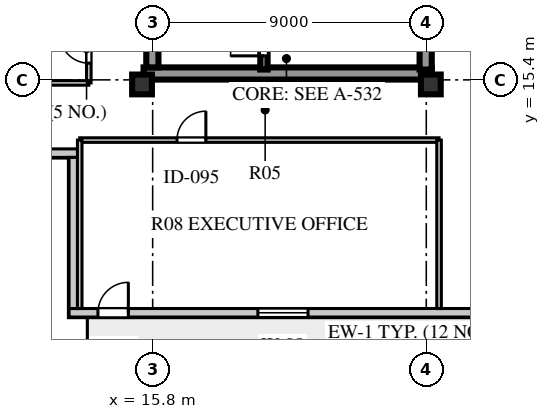
"""IFC4 building model, lengths in metres.
Left out: names, types, materials, properties, quantities, classifications, styles, units other than length and angle.
Written with IfcOpenShell. Run it as: python <this file> out.ifc"""

import sys

from ifc_helpers import new_model, si_unit, direction, frame, frame_2d, origin, origin_2d, place, context, subcontext, project, spatial, rectangle, extrude, element, fill, save


model = new_model("IFC4")
c1 = context("Model", 3, precision=1e-05, world=origin(), true_north=direction((0.0, 1.0)))
c2 = subcontext(c1, "Body", "Model", "MODEL_VIEW")
j1 = project(units=[si_unit("LENGTHUNIT", "METRE"), si_unit("PLANEANGLEUNIT", "RADIAN")], contexts=[c1])
p1 = place(None, origin())
s1 = spatial("IfcSite", under=j1, at=p1, CompositionType="ELEMENT")
p2 = place(p1, origin())
s2 = spatial("IfcBuilding", under=s1, at=p2, CompositionType="ELEMENT")
p3 = place(p2, frame((0.0, 0.0, 245.3)))
s3 = spatial("IfcBuildingStorey", under=s2, at=p3, CompositionType="ELEMENT", Elevation=245.3)
p4 = place(p3, frame((15.5, 15.61, 0.0), z_axis=(0.0, 0.0, 1.0), x_axis=(1.0, 0.0, 0.0)))
e1 = element("IfcWall", 1, at=p4, inside=s3, PredefinedType="SHEAR", context=c2, shape_type="SweptSolid", body=[
    extrude(rectangle(XDim=9.48, YDim=0.4, at=frame_2d((4.74, 0.0))), origin(), (0.0, 0.0, 1.0), 3.66),
])
p5 = place(p3, frame((15.79, 15.81, 0.0), z_axis=(0.0, 0.0, 1.0), x_axis=(0.0, 1.0, 0.0)))
e2 = element("IfcWall", 2, at=p5, inside=s3, PredefinedType="SHEAR", context=c2, shape_type="SweptSolid", body=[
    extrude(rectangle(XDim=25.63, YDim=0.4, at=frame_2d((12.815, 0.0))), origin(), (0.0, 0.0, 1.0), 3.66),
])
p6 = place(p3, frame((24.78, 15.74, 0.0), z_axis=(0.0, 0.0, 1.0), x_axis=(0.0, 1.0, 0.0)))
e3 = element("IfcWall", 3, at=p6, inside=s3, PredefinedType="SHEAR", context=c2, shape_type="SweptSolid", body=[
    extrude(rectangle(XDim=25.76, YDim=0.4, at=frame_2d((12.88, 0.0))), origin(), (0.0, 0.0, 1.0), 3.66),
])
p7 = place(p6, frame((1.61, 0.0, 0.0)))
e4 = element("IfcOpeningElement", 4, at=p7, cuts=e3, PredefinedType="OPENING", context=c2, shape_type="SweptSolid", body=[
    extrude(rectangle(XDim=1.2, YDim=2.1, at=frame_2d((0.6, 1.05))), frame((0.0, 0.21, 0.0), z_axis=(0.0, -1.0, 0.0), x_axis=(1.0, 0.0, 0.0)), (0.0, 0.0, 1.0), 0.42),
])
p8 = place(p6, frame((6.78, 0.0, 0.0)))
e5 = element("IfcOpeningElement", 5, at=p8, cuts=e3, PredefinedType="OPENING", context=c2, shape_type="SweptSolid", body=[
    extrude(rectangle(XDim=0.85, YDim=2.06, at=frame_2d((0.425, 1.03))), frame((0.0, 0.21, 0.0), z_axis=(0.0, -1.0, 0.0), x_axis=(1.0, 0.0, 0.0)), (0.0, 0.0, 1.0), 0.42),
])
p9 = place(p6, frame((12.11, 0.0, 0.0)))
e6 = element("IfcOpeningElement", 6, at=p9, cuts=e3, PredefinedType="OPENING", context=c2, shape_type="SweptSolid", body=[
    extrude(rectangle(XDim=1.5, YDim=2.12, at=frame_2d((0.75, 1.06))), frame((0.0, 0.21, 0.0), z_axis=(0.0, -1.0, 0.0), x_axis=(1.0, 0.0, 0.0)), (0.0, 0.0, 1.0), 0.42),
])
p10 = place(p6, frame((20.11, 0.0, 0.0)))
e7 = element("IfcOpeningElement", 7, at=p10, cuts=e3, PredefinedType="OPENING", context=c2, shape_type="SweptSolid", body=[
    extrude(rectangle(XDim=1.2, YDim=2.12, at=frame_2d((0.6, 1.06))), frame((0.0, 0.21, 0.0), z_axis=(0.0, -1.0, 0.0), x_axis=(1.0, 0.0, 0.0)), (0.0, 0.0, 1.0), 0.42),
])
p11 = place(p6, frame((24.01, 0.0, 0.0)))
e8 = element("IfcOpeningElement", 8, at=p11, cuts=e3, PredefinedType="OPENING", context=c2, shape_type="SweptSolid", body=[
    extrude(rectangle(XDim=0.95, YDim=2.1, at=frame_2d((0.475, 1.05))), frame((0.0, 0.21, 0.0), z_axis=(0.0, -1.0, 0.0), x_axis=(1.0, 0.0, 0.0)), (0.0, 0.0, 1.0), 0.42),
])
for number, where, z_axis, x_axis in (
    (9, (15.45, 15.25, 0.0), (0.0, 0.0, 1.0), (1.0, 0.0, 0.0)),
    (10, (24.95, 15.25, 0.0), (0.0, 0.0, 1.0), (1.0, 0.0, 0.0)),
):
    element("IfcColumn", number, at=place(p3, frame(where, z_axis=z_axis, x_axis=x_axis)), inside=s3, PredefinedType="COLUMN", context=c2, shape_type="SweptSolid", body=[
        extrude(rectangle(XDim=0.65, YDim=0.65, at=origin_2d()), origin(), (0.0, 0.0, 1.0), 3.66),
    ])
p12 = place(p3, frame((13.05, 7.74, 0.0), z_axis=(0.0, 0.0, 1.0), x_axis=(1.0, 0.0, 0.0)))
e11 = element("IfcWall", 11, at=p12, inside=s3, PredefinedType="STANDARD", context=c2, shape_type="SweptSolid", body=[
    extrude(rectangle(XDim=32.5, YDim=0.28, at=frame_2d((16.25, 0.0))), origin(), (0.0, 0.0, 1.0), 3.66),
])
p13 = place(p12, frame((0.95, 0.0, 0.0)))
e12 = element("IfcOpeningElement", 12, at=p13, cuts=e11, PredefinedType="OPENING", context=c2, shape_type="SweptSolid", body=[
    extrude(rectangle(XDim=1.0, YDim=2.05, at=frame_2d((0.5, 1.025))), frame((0.0, 0.15, 0.0), z_axis=(0.0, -1.0, 0.0), x_axis=(1.0, 0.0, 0.0)), (0.0, 0.0, 1.0), 0.3),
])
p14 = place(p12, frame((6.21, 0.0, 0.8)))
e13 = element("IfcOpeningElement", 13, at=p14, cuts=e11, PredefinedType="OPENING", context=c2, shape_type="SweptSolid", body=[
    extrude(rectangle(XDim=1.65, YDim=1.95, at=frame_2d((0.825, 0.975))), frame((0.0, 0.15, 0.0), z_axis=(0.0, -1.0, 0.0), x_axis=(1.0, 0.0, 0.0)), (0.0, 0.0, 1.0), 0.3),
])
p15 = place(p12, frame((14.577, 0.0, 0.8)))
e14 = element("IfcOpeningElement", 14, at=p15, cuts=e11, PredefinedType="OPENING", context=c2, shape_type="SweptSolid", body=[
    extrude(rectangle(XDim=1.95, YDim=2.0, at=frame_2d((0.975, 1.0))), frame((0.0, 0.15, 0.0), z_axis=(0.0, -1.0, 0.0), x_axis=(1.0, 0.0, 0.0)), (0.0, 0.0, 1.0), 0.3),
])
p16 = place(p12, frame((20.463, 0.0, 0.8)))
e15 = element("IfcOpeningElement", 15, at=p16, cuts=e11, PredefinedType="OPENING", context=c2, shape_type="SweptSolid", body=[
    extrude(rectangle(XDim=2.25, YDim=2.0, at=frame_2d((1.125, 1.0))), frame((0.0, 0.15, 0.0), z_axis=(0.0, -1.0, 0.0), x_axis=(1.0, 0.0, 0.0)), (0.0, 0.0, 1.0), 0.3),
])
p17 = place(p12, frame((28.345, 0.0, 0.8)))
e16 = element("IfcOpeningElement", 16, at=p17, cuts=e11, PredefinedType="OPENING", context=c2, shape_type="SweptSolid", body=[
    extrude(rectangle(XDim=1.8, YDim=2.0, at=frame_2d((0.9, 1.0))), frame((0.0, 0.15, 0.0), z_axis=(0.0, -1.0, 0.0), x_axis=(1.0, 0.0, 0.0)), (0.0, 0.0, 1.0), 0.3),
])
p18 = place(p3, frame((7.8, 12.99, 0.0), z_axis=(0.0, 0.0, 1.0), x_axis=(1.0, 0.0, 0.0)))
e17 = element("IfcWall", 17, at=p18, inside=s3, PredefinedType="STANDARD", context=c2, shape_type="SweptSolid", body=[
    extrude(rectangle(XDim=5.53, YDim=0.28, at=frame_2d((2.765, 0.0))), origin(), (0.0, 0.0, 1.0), 3.66),
])
p19 = place(p3, frame((13.19, 12.85, 0.0), z_axis=(0.0, 0.0, 1.0), x_axis=(0.0, -1.0, 0.0)))
e18 = element("IfcWall", 18, at=p19, inside=s3, PredefinedType="STANDARD", context=c2, shape_type="SweptSolid", body=[
    extrude(rectangle(XDim=4.97, YDim=0.28, at=frame_2d((2.485, 0.0))), origin(), (0.0, 0.0, 1.0), 3.66),
])
p20 = place(p3, frame((19.46, 15.74, 0.0), z_axis=(0.0, 0.0, 1.0), x_axis=(0.0, 1.0, 0.0)))
e19 = element("IfcWall", 19, at=p20, inside=s3, PredefinedType="SHEAR", context=c2, shape_type="SweptSolid", body=[
    extrude(rectangle(XDim=8.2, YDim=0.24, at=frame_2d((4.1, 0.0))), origin(), (0.0, 0.0, 1.0), 3.9),
])
p21 = place(p20, frame((0.45, 0.0, 0.0)))
e20 = element("IfcOpeningElement", 20, at=p21, cuts=e19, PredefinedType="OPENING", context=c2, shape_type="SweptSolid", body=[
    extrude(rectangle(XDim=1.1, YDim=2.1, at=frame_2d((0.55, 1.05))), frame((0.0, 0.13, 0.0), z_axis=(0.0, -1.0, 0.0), x_axis=(1.0, 0.0, 0.0)), (0.0, 0.0, 1.0), 0.26),
])
p22 = place(p3, frame((13.4, 13.42, 0.0), z_axis=(0.0, 0.0, 1.0), x_axis=(1.0, 0.0, 0.0)))
e21 = element("IfcWall", 21, at=p22, inside=s3, PredefinedType="PARTITIONING", context=c2, shape_type="SweptSolid", body=[
    extrude(rectangle(XDim=11.82, YDim=0.15, at=frame_2d((5.91, 0.0))), origin(), (0.0, 0.0, 1.0), 3.66),
])
p23 = place(p22, frame((3.2, 0.0, 0.0)))
e22 = element("IfcOpeningElement", 22, at=p23, cuts=e21, PredefinedType="OPENING", context=c2, shape_type="SweptSolid", body=[
    extrude(rectangle(XDim=0.95, YDim=2.08, at=frame_2d((0.475, 1.04))), frame((0.0, 0.085, 0.0), z_axis=(0.0, -1.0, 0.0), x_axis=(1.0, 0.0, 0.0)), (0.0, 0.0, 1.0), 0.17),
])
p24 = place(p3, frame((13.4, 7.88, 0.0), z_axis=(0.0, 0.0, 1.0), x_axis=(0.0, 1.0, 0.0)))
e23 = element("IfcWall", 23, at=p24, inside=s3, PredefinedType="PARTITIONING", context=c2, shape_type="SweptSolid", body=[
    extrude(rectangle(XDim=5.54, YDim=0.15, at=frame_2d((2.77, 0.0))), origin(), (0.0, 0.0, 1.0), 3.66),
])
p25 = place(p3, frame((25.22, 7.88, 0.0), z_axis=(0.0, 0.0, 1.0), x_axis=(0.0, 1.0, 0.0)))
e24 = element("IfcWall", 24, at=p25, inside=s3, PredefinedType="PARTITIONING", context=c2, shape_type="SweptSolid", body=[
    extrude(rectangle(XDim=5.54, YDim=0.15, at=frame_2d((2.77, 0.0))), origin(), (0.0, 0.0, 1.0), 3.21),
])
p26 = place(p3, frame((13.7, 15.3, 0.0), z_axis=(0.0, 0.0, 1.0), x_axis=(0.0, 1.0, 0.0)))
e25 = element("IfcWall", 25, at=p26, inside=s3, PredefinedType="PARTITIONING", context=c2, shape_type="SweptSolid", body=[
    extrude(rectangle(XDim=26.6, YDim=0.15, at=frame_2d((13.3, 0.0))), origin(), (0.0, 0.0, 1.0), 3.66),
])
p27 = place(p26, frame((0.65, 0.0, 0.0)))
e26 = element("IfcOpeningElement", 26, at=p27, cuts=e25, PredefinedType="OPENING", context=c2, shape_type="SweptSolid", body=[
    extrude(rectangle(XDim=0.95, YDim=2.1, at=frame_2d((0.475, 1.05))), frame((0.0, 0.085, 0.0), z_axis=(0.0, -1.0, 0.0), x_axis=(1.0, 0.0, 0.0)), (0.0, 0.0, 1.0), 0.17),
])
p28 = place(p26, frame((11.55, 0.0, 0.0)))
e27 = element("IfcOpeningElement", 27, at=p28, cuts=e25, PredefinedType="OPENING", context=c2, shape_type="SweptSolid", body=[
    extrude(rectangle(XDim=0.95, YDim=2.1, at=frame_2d((0.475, 1.05))), frame((0.0, 0.085, 0.0), z_axis=(0.0, -1.0, 0.0), x_axis=(1.0, 0.0, 0.0)), (0.0, 0.0, 1.0), 0.17),
])
p29 = place(p3, frame((8.08, 15.3, 0.0), z_axis=(0.0, 0.0, 1.0), x_axis=(1.0, 0.0, 0.0)))
e28 = element("IfcWall", 28, at=p29, inside=s3, PredefinedType="PARTITIONING", context=c2, shape_type="SweptSolid", body=[
    extrude(rectangle(XDim=5.62, YDim=0.15, at=frame_2d((2.81, 0.0))), origin(), (0.0, 0.0, 1.0), 3.21),
])
p30 = place(p13, frame((1.0, 0.0, 0.0), z_axis=(0.0, 0.0, 1.0), x_axis=(-1.0, 0.0, 0.0)))
e29 = element("IfcDoor", 29, at=p30, inside=s3, OperationType="SINGLE_SWING_LEFT", PredefinedType="DOOR", context=c2, shape_type="SweptSolid", body=[
    extrude(rectangle(XDim=1.0, YDim=2.05, at=frame_2d((0.5, 1.025))), frame((0.0, 0.025, 0.0), z_axis=(0.0, -1.0, 0.0), x_axis=(1.0, 0.0, 0.0)), (0.0, 0.0, 1.0), 0.05),
])
fill(e12, e29)
p31 = place(p14, origin())
e30 = element("IfcWindow", 30, at=p31, inside=s3, PartitioningType="SINGLE_PANEL", PredefinedType="WINDOW", context=c2, shape_type="SweptSolid", body=[
    extrude(rectangle(XDim=1.65, YDim=1.95, at=frame_2d((0.825, 0.975))), frame((0.0, 0.03, 0.0), z_axis=(0.0, -1.0, 0.0), x_axis=(1.0, 0.0, 0.0)), (0.0, 0.0, 1.0), 0.06),
])
fill(e13, e30)
p32 = place(p21, origin())
e31 = element("IfcDoor", 31, at=p32, inside=s3, OperationType="SINGLE_SWING_LEFT", PredefinedType="DOOR", context=c2, shape_type="SweptSolid", body=[
    extrude(rectangle(XDim=1.1, YDim=2.1, at=frame_2d((0.55, 1.05))), frame((0.0, 0.025, 0.0), z_axis=(0.0, -1.0, 0.0), x_axis=(1.0, 0.0, 0.0)), (0.0, 0.0, 1.0), 0.05),
])
fill(e20, e31)
p33 = place(p23, frame((0.95, 0.0, 0.0), z_axis=(0.0, 0.0, 1.0), x_axis=(-1.0, 0.0, 0.0)))
e32 = element("IfcDoor", 32, at=p33, inside=s3, OperationType="SINGLE_SWING_LEFT", PredefinedType="DOOR", context=c2, shape_type="SweptSolid", body=[
    extrude(rectangle(XDim=0.95, YDim=2.08, at=frame_2d((0.475, 1.04))), frame((0.0, 0.025, 0.0), z_axis=(0.0, -1.0, 0.0), x_axis=(1.0, 0.0, 0.0)), (0.0, 0.0, 1.0), 0.05),
])
fill(e22, e32)
p34 = place(p27, frame((0.95, 0.0, 0.0), z_axis=(0.0, 0.0, 1.0), x_axis=(-1.0, 0.0, 0.0)))
e33 = element("IfcDoor", 33, at=p34, inside=s3, OperationType="SINGLE_SWING_LEFT", PredefinedType="DOOR", context=c2, shape_type="SweptSolid", body=[
    extrude(rectangle(XDim=0.95, YDim=2.1, at=frame_2d((0.475, 1.05))), frame((0.0, 0.025, 0.0), z_axis=(0.0, -1.0, 0.0), x_axis=(1.0, 0.0, 0.0)), (0.0, 0.0, 1.0), 0.05),
])
fill(e26, e33)
save(model, sys.argv[1])
